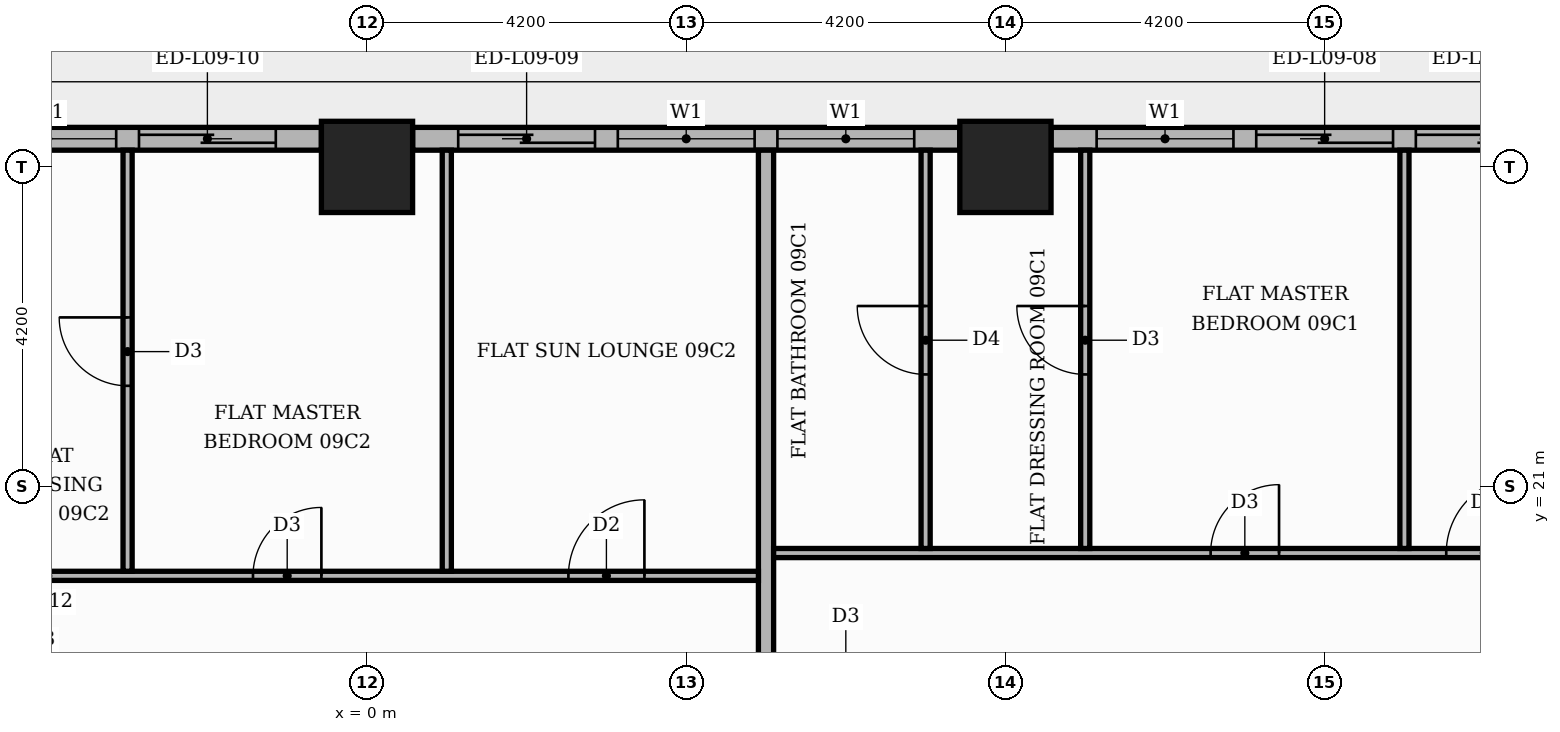
"""IFC4 building model, lengths in metres.
Left out: names, types, materials, properties, quantities, classifications, styles, units other than length and angle.
Written with IfcOpenShell. Run it as: python <this file> out.ifc"""

import sys

from ifc_helpers import new_model, si_unit, direction, frame, frame_2d, origin, origin_2d, place, context, subcontext, project, spatial, rectangle, extrude, element, fill, save


model = new_model("IFC4")
c1 = context("Model", 3, precision=1e-05, world=origin(), true_north=direction((0.0, 1.0)))
c2 = subcontext(c1, "Body", "Model", "MODEL_VIEW")
j1 = project(units=[si_unit("LENGTHUNIT", "METRE"), si_unit("PLANEANGLEUNIT", "RADIAN")], contexts=[c1])
p1 = place(None, origin())
s1 = spatial("IfcSite", under=j1, at=p1, CompositionType="ELEMENT")
p2 = place(p1, origin())
s2 = spatial("IfcBuilding", under=s1, at=p2, CompositionType="ELEMENT")
p3 = place(p2, frame((0.0, 0.0, 42.6)))
s3 = spatial("IfcBuildingStorey", under=s2, at=p3, CompositionType="ELEMENT", Elevation=42.6)
for number, where, z_axis, x_axis in (
    (1, (0.0, 25.2, 0.0), (0.0, 0.0, 1.0), (1.0, 0.0, 0.0)),
    (2, (8.4, 25.2, 0.0), (0.0, 0.0, 1.0), (1.0, 0.0, 0.0)),
):
    element("IfcColumn", number, at=place(p3, frame(where, z_axis=z_axis, x_axis=x_axis)), inside=s3, PredefinedType="COLUMN", context=c2, shape_type="SweptSolid", body=[
        extrude(rectangle(XDim=1.2, YDim=1.2, at=origin_2d()), origin(), (0.0, 0.0, 1.0), 3.9),
    ])
p4 = place(p3, frame((16.2, 25.57, 0.0), z_axis=(0.0, 0.0, 1.0), x_axis=(-1.0, 0.0, 0.0)))
e3 = element("IfcWall", 3, at=p4, inside=s3, PredefinedType="STANDARD", context=c2, shape_type="SweptSolid", body=[
    extrude(rectangle(XDim=7.2, YDim=0.3, at=frame_2d((3.6, 0.0))), origin(), (0.0, 0.0, 1.0), 3.48),
])
p5 = place(p4, frame((0.6, 0.0, 0.0)))
e4 = element("IfcOpeningElement", 4, at=p5, cuts=e3, PredefinedType="OPENING", context=c2, shape_type="SweptSolid", body=[
    extrude(rectangle(XDim=1.8, YDim=2.4, at=frame_2d((0.9, 1.2))), frame((0.0, 0.16, 0.0), z_axis=(0.0, -1.0, 0.0), x_axis=(1.0, 0.0, 0.0)), (0.0, 0.0, 1.0), 0.32),
])
p6 = place(p4, frame((2.7, 0.0, 0.0)))
e5 = element("IfcOpeningElement", 5, at=p6, cuts=e3, PredefinedType="OPENING", context=c2, shape_type="SweptSolid", body=[
    extrude(rectangle(XDim=1.8, YDim=2.4, at=frame_2d((0.9, 1.2))), frame((0.0, 0.16, 0.0), z_axis=(0.0, -1.0, 0.0), x_axis=(1.0, 0.0, 0.0)), (0.0, 0.0, 1.0), 0.32),
])
p7 = place(p4, frame((4.8, 0.0, 0.9)))
e6 = element("IfcOpeningElement", 6, at=p7, cuts=e3, PredefinedType="OPENING", context=c2, shape_type="SweptSolid", body=[
    extrude(rectangle(XDim=1.8, YDim=2.1, at=frame_2d((0.9, 1.05))), frame((0.0, 0.16, 0.0), z_axis=(0.0, -1.0, 0.0), x_axis=(1.0, 0.0, 0.0)), (0.0, 0.0, 1.0), 0.32),
])
p8 = place(p3, frame((7.8, 25.57, 0.0), z_axis=(0.0, 0.0, 1.0), x_axis=(-1.0, 0.0, 0.0)))
e7 = element("IfcWall", 7, at=p8, inside=s3, PredefinedType="STANDARD", context=c2, shape_type="SweptSolid", body=[
    extrude(rectangle(XDim=7.2, YDim=0.3, at=frame_2d((3.6, 0.0))), origin(), (0.0, 0.0, 1.0), 3.48),
])
p9 = place(p8, frame((0.6, 0.0, 0.9)))
e8 = element("IfcOpeningElement", 8, at=p9, cuts=e7, PredefinedType="OPENING", context=c2, shape_type="SweptSolid", body=[
    extrude(rectangle(XDim=1.8, YDim=2.1, at=frame_2d((0.9, 1.05))), frame((0.0, 0.16, 0.0), z_axis=(0.0, -1.0, 0.0), x_axis=(1.0, 0.0, 0.0)), (0.0, 0.0, 1.0), 0.32),
])
p10 = place(p8, frame((2.7, 0.0, 0.9)))
e9 = element("IfcOpeningElement", 9, at=p10, cuts=e7, PredefinedType="OPENING", context=c2, shape_type="SweptSolid", body=[
    extrude(rectangle(XDim=1.8, YDim=2.1, at=frame_2d((0.9, 1.05))), frame((0.0, 0.16, 0.0), z_axis=(0.0, -1.0, 0.0), x_axis=(1.0, 0.0, 0.0)), (0.0, 0.0, 1.0), 0.32),
])
p11 = place(p8, frame((4.8, 0.0, 0.0)))
e10 = element("IfcOpeningElement", 10, at=p11, cuts=e7, PredefinedType="OPENING", context=c2, shape_type="SweptSolid", body=[
    extrude(rectangle(XDim=1.8, YDim=2.4, at=frame_2d((0.9, 1.2))), frame((0.0, 0.16, 0.0), z_axis=(0.0, -1.0, 0.0), x_axis=(1.0, 0.0, 0.0)), (0.0, 0.0, 1.0), 0.32),
])
p12 = place(p3, frame((-0.6, 25.57, 0.0), z_axis=(0.0, 0.0, 1.0), x_axis=(-1.0, 0.0, 0.0)))
e11 = element("IfcWall", 11, at=p12, inside=s3, PredefinedType="STANDARD", context=c2, shape_type="SweptSolid", body=[
    extrude(rectangle(XDim=7.2, YDim=0.3, at=frame_2d((3.6, 0.0))), origin(), (0.0, 0.0, 1.0), 3.48),
])
p13 = place(p12, frame((0.6, 0.0, 0.0)))
e12 = element("IfcOpeningElement", 12, at=p13, cuts=e11, PredefinedType="OPENING", context=c2, shape_type="SweptSolid", body=[
    extrude(rectangle(XDim=1.8, YDim=2.4, at=frame_2d((0.9, 1.2))), frame((0.0, 0.16, 0.0), z_axis=(0.0, -1.0, 0.0), x_axis=(1.0, 0.0, 0.0)), (0.0, 0.0, 1.0), 0.32),
])
p14 = place(p12, frame((2.7, 0.0, 0.9)))
e13 = element("IfcOpeningElement", 13, at=p14, cuts=e11, PredefinedType="OPENING", context=c2, shape_type="SweptSolid", body=[
    extrude(rectangle(XDim=1.8, YDim=2.1, at=frame_2d((0.9, 1.05))), frame((0.0, 0.16, 0.0), z_axis=(0.0, -1.0, 0.0), x_axis=(1.0, 0.0, 0.0)), (0.0, 0.0, 1.0), 0.32),
])
p15 = place(p12, frame((4.8, 0.0, 0.9)))
e14 = element("IfcOpeningElement", 14, at=p15, cuts=e11, PredefinedType="OPENING", context=c2, shape_type="SweptSolid", body=[
    extrude(rectangle(XDim=1.8, YDim=2.1, at=frame_2d((0.9, 1.05))), frame((0.0, 0.16, 0.0), z_axis=(0.0, -1.0, 0.0), x_axis=(1.0, 0.0, 0.0)), (0.0, 0.0, 1.0), 0.32),
])
p16 = place(p3, frame((5.25, 13.75, 0.0), z_axis=(0.0, 0.0, 1.0), x_axis=(0.0, 1.0, 0.0)))
e15 = element("IfcWall", 15, at=p16, inside=s3, PredefinedType="PARTITIONING", context=c2, shape_type="SweptSolid", body=[
    extrude(rectangle(XDim=11.67, YDim=0.2, at=frame_2d((5.835, 0.0))), origin(), (0.0, 0.0, 1.0), 3.48),
])
p17 = place(p3, frame((-13.55, 19.82, 0.0), z_axis=(0.0, 0.0, 1.0), x_axis=(1.0, 0.0, 0.0)))
e16 = element("IfcWall", 16, at=p17, inside=s3, PredefinedType="PARTITIONING", context=c2, shape_type="SweptSolid", body=[
    extrude(rectangle(XDim=18.7, YDim=0.12, at=frame_2d((9.35, 0.0))), origin(), (0.0, 0.0, 1.0), 3.48),
])
p18 = place(p17, frame((16.2, 0.0, 0.0)))
e17 = element("IfcOpeningElement", 17, at=p18, cuts=e16, PredefinedType="OPENING", context=c2, shape_type="SweptSolid", body=[
    extrude(rectangle(XDim=1.0, YDim=2.1, at=frame_2d((0.5, 1.05))), frame((0.0, 0.07, 0.0), z_axis=(0.0, -1.0, 0.0), x_axis=(1.0, 0.0, 0.0)), (0.0, 0.0, 1.0), 0.14),
])
p19 = place(p17, frame((12.05, 0.0, 0.0)))
e18 = element("IfcOpeningElement", 18, at=p19, cuts=e16, PredefinedType="OPENING", context=c2, shape_type="SweptSolid", body=[
    extrude(rectangle(XDim=0.9, YDim=2.1, at=frame_2d((0.45, 1.05))), frame((0.0, 0.07, 0.0), z_axis=(0.0, -1.0, 0.0), x_axis=(1.0, 0.0, 0.0)), (0.0, 0.0, 1.0), 0.14),
])
p20 = place(p17, frame((3.65, 0.0, 0.0)))
e19 = element("IfcOpeningElement", 19, at=p20, cuts=e16, PredefinedType="OPENING", context=c2, shape_type="SweptSolid", body=[
    extrude(rectangle(XDim=0.9, YDim=2.1, at=frame_2d((0.45, 1.05))), frame((0.0, 0.07, 0.0), z_axis=(0.0, -1.0, 0.0), x_axis=(1.0, 0.0, 0.0)), (0.0, 0.0, 1.0), 0.14),
])
p21 = place(p3, frame((-3.15, 19.88, 0.0), z_axis=(0.0, 0.0, 1.0), x_axis=(0.0, 1.0, 0.0)))
e20 = element("IfcWall", 20, at=p21, inside=s3, PredefinedType="PARTITIONING", context=c2, shape_type="SweptSolid", body=[
    extrude(rectangle(XDim=5.54, YDim=0.12, at=frame_2d((2.77, 0.0))), origin(), (0.0, 0.0, 1.0), 3.48),
])
p22 = place(p21, frame((2.44, 0.0, 0.0)))
e21 = element("IfcOpeningElement", 21, at=p22, cuts=e20, PredefinedType="OPENING", context=c2, shape_type="SweptSolid", body=[
    extrude(rectangle(XDim=0.9, YDim=2.1, at=frame_2d((0.45, 1.05))), frame((0.0, 0.07, 0.0), z_axis=(0.0, -1.0, 0.0), x_axis=(1.0, 0.0, 0.0)), (0.0, 0.0, 1.0), 0.14),
])
p23 = place(p3, frame((1.05, 19.88, 0.0), z_axis=(0.0, 0.0, 1.0), x_axis=(0.0, 1.0, 0.0)))
e22 = element("IfcWall", 22, at=p23, inside=s3, PredefinedType="PARTITIONING", context=c2, shape_type="SweptSolid", body=[
    extrude(rectangle(XDim=5.54, YDim=0.12, at=frame_2d((2.77, 0.0))), origin(), (0.0, 0.0, 1.0), 3.48),
])
p24 = place(p3, frame((5.35, 20.12, 0.0), z_axis=(0.0, 0.0, 1.0), x_axis=(1.0, 0.0, 0.0)))
e23 = element("IfcWall", 23, at=p24, inside=s3, PredefinedType="PARTITIONING", context=c2, shape_type="SweptSolid", body=[
    extrude(rectangle(XDim=11.95, YDim=0.12, at=frame_2d((5.975, 0.0))), origin(), (0.0, 0.0, 1.0), 3.48),
])
p25 = place(p24, frame((8.85, 0.0, 0.0)))
e24 = element("IfcOpeningElement", 24, at=p25, cuts=e23, PredefinedType="OPENING", context=c2, shape_type="SweptSolid", body=[
    extrude(rectangle(XDim=1.0, YDim=2.1, at=frame_2d((0.5, 1.05))), frame((0.0, 0.07, 0.0), z_axis=(0.0, -1.0, 0.0), x_axis=(1.0, 0.0, 0.0)), (0.0, 0.0, 1.0), 0.14),
])
p26 = place(p24, frame((5.75, 0.0, 0.0)))
e25 = element("IfcOpeningElement", 25, at=p26, cuts=e23, PredefinedType="OPENING", context=c2, shape_type="SweptSolid", body=[
    extrude(rectangle(XDim=0.9, YDim=2.1, at=frame_2d((0.45, 1.05))), frame((0.0, 0.07, 0.0), z_axis=(0.0, -1.0, 0.0), x_axis=(1.0, 0.0, 0.0)), (0.0, 0.0, 1.0), 0.14),
])
p27 = place(p3, frame((7.35, 20.18, 0.0), z_axis=(0.0, 0.0, 1.0), x_axis=(0.0, 1.0, 0.0)))
e26 = element("IfcWall", 26, at=p27, inside=s3, PredefinedType="PARTITIONING", context=c2, shape_type="SweptSolid", body=[
    extrude(rectangle(XDim=5.24, YDim=0.12, at=frame_2d((2.62, 0.0))), origin(), (0.0, 0.0, 1.0), 3.48),
])
p28 = place(p27, frame((2.29, 0.0, 0.0)))
e27 = element("IfcOpeningElement", 27, at=p28, cuts=e26, PredefinedType="OPENING", context=c2, shape_type="SweptSolid", body=[
    extrude(rectangle(XDim=0.9, YDim=2.1, at=frame_2d((0.45, 1.05))), frame((0.0, 0.07, 0.0), z_axis=(0.0, -1.0, 0.0), x_axis=(1.0, 0.0, 0.0)), (0.0, 0.0, 1.0), 0.14),
])
p29 = place(p3, frame((9.45, 20.18, 0.0), z_axis=(0.0, 0.0, 1.0), x_axis=(0.0, 1.0, 0.0)))
e28 = element("IfcWall", 28, at=p29, inside=s3, PredefinedType="PARTITIONING", context=c2, shape_type="SweptSolid", body=[
    extrude(rectangle(XDim=5.24, YDim=0.12, at=frame_2d((2.62, 0.0))), origin(), (0.0, 0.0, 1.0), 3.48),
])
p30 = place(p29, frame((2.29, 0.0, 0.0)))
e29 = element("IfcOpeningElement", 29, at=p30, cuts=e28, PredefinedType="OPENING", context=c2, shape_type="SweptSolid", body=[
    extrude(rectangle(XDim=0.9, YDim=2.1, at=frame_2d((0.45, 1.05))), frame((0.0, 0.07, 0.0), z_axis=(0.0, -1.0, 0.0), x_axis=(1.0, 0.0, 0.0)), (0.0, 0.0, 1.0), 0.14),
])
p31 = place(p3, frame((13.65, 20.18, 0.0), z_axis=(0.0, 0.0, 1.0), x_axis=(0.0, 1.0, 0.0)))
e30 = element("IfcWall", 30, at=p31, inside=s3, PredefinedType="PARTITIONING", context=c2, shape_type="SweptSolid", body=[
    extrude(rectangle(XDim=5.24, YDim=0.12, at=frame_2d((2.62, 0.0))), origin(), (0.0, 0.0, 1.0), 3.48),
])
p32 = place(p5, origin())
e31 = element("IfcDoor", 31, at=p32, inside=s3, OperationType="SLIDING_TO_LEFT", PredefinedType="DOOR", context=c2, shape_type="SweptSolid", body=[
    extrude(rectangle(XDim=1.8, YDim=2.4, at=frame_2d((0.9, 1.2))), frame((0.0, 0.025, 0.0), z_axis=(0.0, -1.0, 0.0), x_axis=(1.0, 0.0, 0.0)), (0.0, 0.0, 1.0), 0.05),
])
fill(e4, e31)
p33 = place(p6, origin())
e32 = element("IfcDoor", 32, at=p33, inside=s3, OperationType="SLIDING_TO_RIGHT", PredefinedType="DOOR", context=c2, shape_type="SweptSolid", body=[
    extrude(rectangle(XDim=1.8, YDim=2.4, at=frame_2d((0.9, 1.2))), frame((0.0, 0.025, 0.0), z_axis=(0.0, -1.0, 0.0), x_axis=(1.0, 0.0, 0.0)), (0.0, 0.0, 1.0), 0.05),
])
fill(e5, e32)
p34 = place(p7, origin())
e33 = element("IfcWindow", 33, at=p34, inside=s3, PartitioningType="SINGLE_PANEL", PredefinedType="WINDOW", context=c2, shape_type="SweptSolid", body=[
    extrude(rectangle(XDim=1.8, YDim=2.1, at=frame_2d((0.9, 1.05))), frame((0.0, 0.03, 0.0), z_axis=(0.0, -1.0, 0.0), x_axis=(1.0, 0.0, 0.0)), (0.0, 0.0, 1.0), 0.06),
])
fill(e6, e33)
p35 = place(p9, origin())
e34 = element("IfcWindow", 34, at=p35, inside=s3, PartitioningType="SINGLE_PANEL", PredefinedType="WINDOW", context=c2, shape_type="SweptSolid", body=[
    extrude(rectangle(XDim=1.8, YDim=2.1, at=frame_2d((0.9, 1.05))), frame((0.0, 0.03, 0.0), z_axis=(0.0, -1.0, 0.0), x_axis=(1.0, 0.0, 0.0)), (0.0, 0.0, 1.0), 0.06),
])
fill(e8, e34)
p36 = place(p10, origin())
e35 = element("IfcWindow", 35, at=p36, inside=s3, PartitioningType="SINGLE_PANEL", PredefinedType="WINDOW", context=c2, shape_type="SweptSolid", body=[
    extrude(rectangle(XDim=1.8, YDim=2.1, at=frame_2d((0.9, 1.05))), frame((0.0, 0.03, 0.0), z_axis=(0.0, -1.0, 0.0), x_axis=(1.0, 0.0, 0.0)), (0.0, 0.0, 1.0), 0.06),
])
fill(e9, e35)
p37 = place(p11, origin())
e36 = element("IfcDoor", 36, at=p37, inside=s3, OperationType="SLIDING_TO_RIGHT", PredefinedType="DOOR", context=c2, shape_type="SweptSolid", body=[
    extrude(rectangle(XDim=1.8, YDim=2.4, at=frame_2d((0.9, 1.2))), frame((0.0, 0.025, 0.0), z_axis=(0.0, -1.0, 0.0), x_axis=(1.0, 0.0, 0.0)), (0.0, 0.0, 1.0), 0.05),
])
fill(e10, e36)
p38 = place(p13, origin())
e37 = element("IfcDoor", 37, at=p38, inside=s3, OperationType="SLIDING_TO_LEFT", PredefinedType="DOOR", context=c2, shape_type="SweptSolid", body=[
    extrude(rectangle(XDim=1.8, YDim=2.4, at=frame_2d((0.9, 1.2))), frame((0.0, 0.025, 0.0), z_axis=(0.0, -1.0, 0.0), x_axis=(1.0, 0.0, 0.0)), (0.0, 0.0, 1.0), 0.05),
])
fill(e12, e37)
p39 = place(p14, origin())
e38 = element("IfcWindow", 38, at=p39, inside=s3, PartitioningType="SINGLE_PANEL", PredefinedType="WINDOW", context=c2, shape_type="SweptSolid", body=[
    extrude(rectangle(XDim=1.8, YDim=2.1, at=frame_2d((0.9, 1.05))), frame((0.0, 0.03, 0.0), z_axis=(0.0, -1.0, 0.0), x_axis=(1.0, 0.0, 0.0)), (0.0, 0.0, 1.0), 0.06),
])
fill(e13, e38)
p40 = place(p25, origin())
e39 = element("IfcDoor", 39, at=p40, inside=s3, OperationType="SINGLE_SWING_RIGHT", PredefinedType="DOOR", context=c2, shape_type="SweptSolid", body=[
    extrude(rectangle(XDim=1.0, YDim=2.1, at=frame_2d((0.5, 1.05))), frame((0.0, 0.025, 0.0), z_axis=(0.0, -1.0, 0.0), x_axis=(1.0, 0.0, 0.0)), (0.0, 0.0, 1.0), 0.05),
])
fill(e24, e39)
p41 = place(p26, origin())
e40 = element("IfcDoor", 40, at=p41, inside=s3, OperationType="SINGLE_SWING_RIGHT", PredefinedType="DOOR", context=c2, shape_type="SweptSolid", body=[
    extrude(rectangle(XDim=0.9, YDim=2.1, at=frame_2d((0.45, 1.05))), frame((0.0, 0.025, 0.0), z_axis=(0.0, -1.0, 0.0), x_axis=(1.0, 0.0, 0.0)), (0.0, 0.0, 1.0), 0.05),
])
fill(e25, e40)
p42 = place(p30, origin())
e41 = element("IfcDoor", 41, at=p42, inside=s3, OperationType="SINGLE_SWING_RIGHT", PredefinedType="DOOR", context=c2, shape_type="SweptSolid", body=[
    extrude(rectangle(XDim=0.9, YDim=2.1, at=frame_2d((0.45, 1.05))), frame((0.0, 0.025, 0.0), z_axis=(0.0, -1.0, 0.0), x_axis=(1.0, 0.0, 0.0)), (0.0, 0.0, 1.0), 0.05),
])
fill(e29, e41)
p43 = place(p28, origin())
e42 = element("IfcDoor", 42, at=p43, inside=s3, OperationType="SINGLE_SWING_RIGHT", PredefinedType="DOOR", context=c2, shape_type="SweptSolid", body=[
    extrude(rectangle(XDim=0.9, YDim=2.1, at=frame_2d((0.45, 1.05))), frame((0.0, 0.025, 0.0), z_axis=(0.0, -1.0, 0.0), x_axis=(1.0, 0.0, 0.0)), (0.0, 0.0, 1.0), 0.05),
])
fill(e27, e42)
p44 = place(p18, origin())
e43 = element("IfcDoor", 43, at=p44, inside=s3, OperationType="SINGLE_SWING_RIGHT", PredefinedType="DOOR", context=c2, shape_type="SweptSolid", body=[
    extrude(rectangle(XDim=1.0, YDim=2.1, at=frame_2d((0.5, 1.05))), frame((0.0, 0.025, 0.0), z_axis=(0.0, -1.0, 0.0), x_axis=(1.0, 0.0, 0.0)), (0.0, 0.0, 1.0), 0.05),
])
fill(e17, e43)
p45 = place(p19, origin())
e44 = element("IfcDoor", 44, at=p45, inside=s3, OperationType="SINGLE_SWING_RIGHT", PredefinedType="DOOR", context=c2, shape_type="SweptSolid", body=[
    extrude(rectangle(XDim=0.9, YDim=2.1, at=frame_2d((0.45, 1.05))), frame((0.0, 0.025, 0.0), z_axis=(0.0, -1.0, 0.0), x_axis=(1.0, 0.0, 0.0)), (0.0, 0.0, 1.0), 0.05),
])
fill(e18, e44)
p46 = place(p22, origin())
e45 = element("IfcDoor", 45, at=p46, inside=s3, OperationType="SINGLE_SWING_RIGHT", PredefinedType="DOOR", context=c2, shape_type="SweptSolid", body=[
    extrude(rectangle(XDim=0.9, YDim=2.1, at=frame_2d((0.45, 1.05))), frame((0.0, 0.025, 0.0), z_axis=(0.0, -1.0, 0.0), x_axis=(1.0, 0.0, 0.0)), (0.0, 0.0, 1.0), 0.05),
])
fill(e21, e45)
save(model, sys.argv[1])
